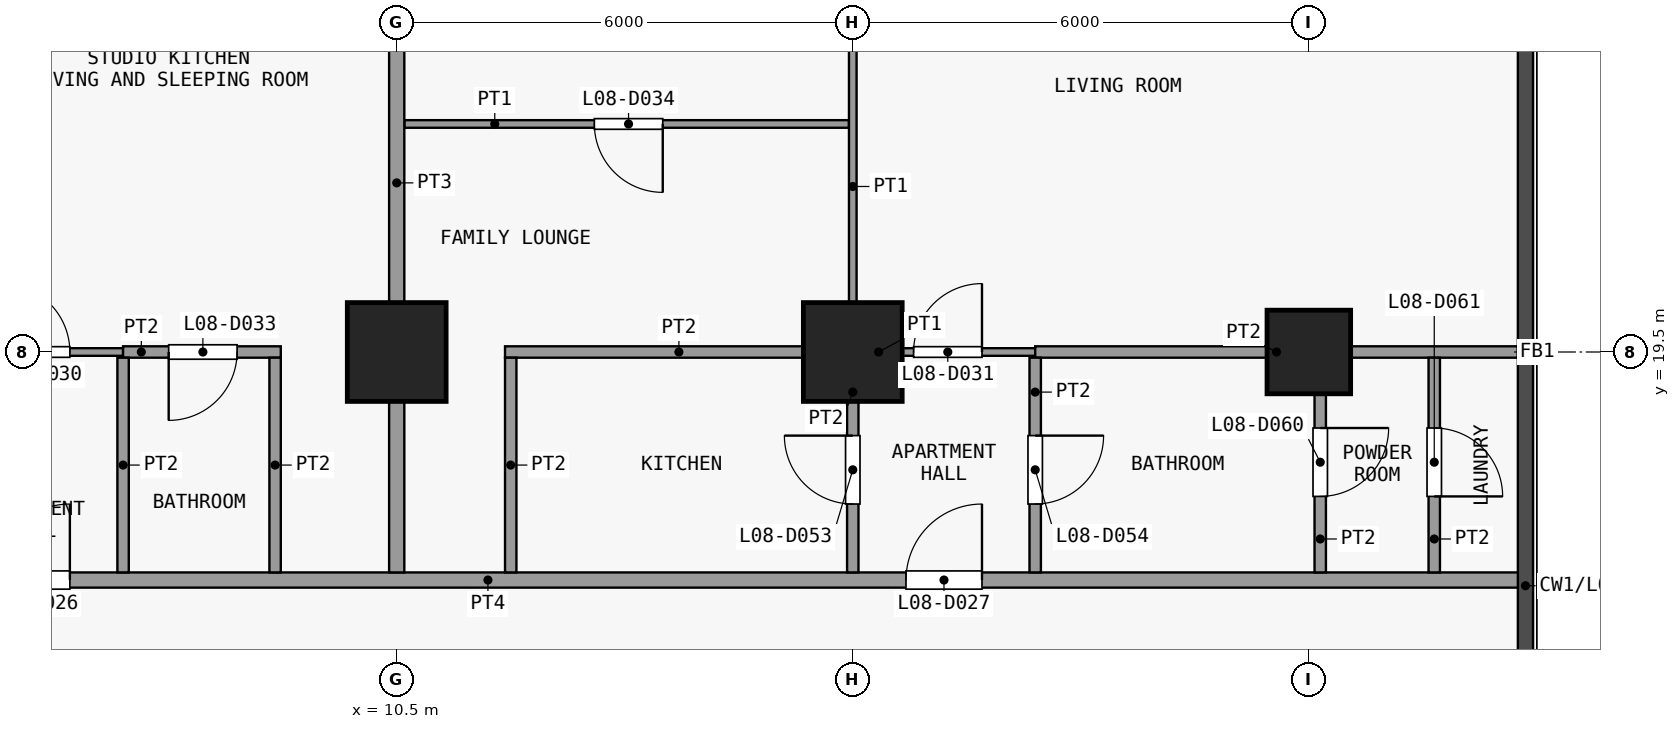
"""IFC4 building model, lengths in metres.
Left out: names, types, materials, properties, quantities, classifications, styles, units other than length and angle.
Written with IfcOpenShell. Run it as: python <this file> out.ifc"""

import sys

from ifc_helpers import new_model, si_unit, direction, frame, frame_2d, origin, origin_2d, place, context, subcontext, project, spatial, rectangle, extrude, element, fill, save


model = new_model("IFC4")
c1 = context("Model", 3, precision=1e-05, world=origin(), true_north=direction((0.0, 1.0)))
c2 = subcontext(c1, "Body", "Model", "MODEL_VIEW")
j1 = project(units=[si_unit("LENGTHUNIT", "METRE"), si_unit("PLANEANGLEUNIT", "RADIAN")], contexts=[c1])
p1 = place(None, origin())
s1 = spatial("IfcSite", under=j1, at=p1, CompositionType="ELEMENT")
p2 = place(p1, origin())
s2 = spatial("IfcBuilding", under=s1, at=p2, CompositionType="ELEMENT")
p3 = place(p2, frame((0.0, 0.0, 39.7)))
s3 = spatial("IfcBuildingStorey", under=s2, at=p3, CompositionType="ELEMENT", Elevation=39.7)
for number, where, z_axis, x_axis in (
    (1, (10.5, 19.5, 0.0), (0.0, 0.0, 1.0), (1.0, 0.0, 0.0)),
    (2, (16.5, 19.5, 0.0), (0.0, 0.0, 1.0), (1.0, 0.0, 0.0)),
):
    element("IfcColumn", number, at=place(p3, frame(where, z_axis=z_axis, x_axis=x_axis)), inside=s3, PredefinedType="COLUMN", context=c2, shape_type="SweptSolid", body=[
        extrude(rectangle(XDim=1.3, YDim=1.3, at=origin_2d()), origin(), (0.0, 0.0, 1.0), 3.6),
    ])
p4 = place(p3, frame((22.5, 19.5, 0.0), z_axis=(0.0, 0.0, 1.0), x_axis=(1.0, 0.0, 0.0)))
e3 = element("IfcColumn", 3, at=p4, inside=s3, PredefinedType="COLUMN", context=c2, shape_type="SweptSolid", body=[
    extrude(rectangle(XDim=1.1, YDim=1.1, at=origin_2d()), origin(), (0.0, 0.0, 1.0), 3.6),
])
p5 = place(p3, frame((-25.35, 16.5, 0.0), z_axis=(0.0, 0.0, 1.0), x_axis=(1.0, 0.0, 0.0)))
e4 = element("IfcWall", 4, at=p5, inside=s3, PredefinedType="PARTITIONING", context=c2, shape_type="SweptSolid", body=[
    extrude(rectangle(XDim=50.7, YDim=0.2, at=frame_2d((25.35, 0.0))), origin(), (0.0, 0.0, 1.0), 3.3),
])
p6 = place(p5, frame((4.55, 0.0, 0.0)))
e5 = element("IfcOpeningElement", 5, at=p6, cuts=e4, PredefinedType="OPENING", context=c2, shape_type="SweptSolid", body=[
    extrude(rectangle(XDim=1.0, YDim=2.1, at=frame_2d((0.5, 1.05))), frame((0.0, 0.11, 0.0), z_axis=(0.0, -1.0, 0.0), x_axis=(1.0, 0.0, 0.0)), (0.0, 0.0, 1.0), 0.22),
])
p7 = place(p5, frame((11.35, 0.0, 0.0)))
e6 = element("IfcOpeningElement", 6, at=p7, cuts=e4, PredefinedType="OPENING", context=c2, shape_type="SweptSolid", body=[
    extrude(rectangle(XDim=0.9, YDim=2.1, at=frame_2d((0.45, 1.05))), frame((0.0, 0.11, 0.0), z_axis=(0.0, -1.0, 0.0), x_axis=(1.0, 0.0, 0.0)), (0.0, 0.0, 1.0), 0.22),
])
p8 = place(p5, frame((17.35, 0.0, 0.0)))
e7 = element("IfcOpeningElement", 7, at=p8, cuts=e4, PredefinedType="OPENING", context=c2, shape_type="SweptSolid", body=[
    extrude(rectangle(XDim=0.9, YDim=2.1, at=frame_2d((0.45, 1.05))), frame((0.0, 0.11, 0.0), z_axis=(0.0, -1.0, 0.0), x_axis=(1.0, 0.0, 0.0)), (0.0, 0.0, 1.0), 0.22),
])
p9 = place(p5, frame((24.05, 0.0, 0.0)))
e8 = element("IfcOpeningElement", 8, at=p9, cuts=e4, PredefinedType="OPENING", context=c2, shape_type="SweptSolid", body=[
    extrude(rectangle(XDim=1.0, YDim=2.1, at=frame_2d((0.5, 1.05))), frame((0.0, 0.11, 0.0), z_axis=(0.0, -1.0, 0.0), x_axis=(1.0, 0.0, 0.0)), (0.0, 0.0, 1.0), 0.22),
])
p10 = place(p5, frame((30.55, 0.0, 0.0)))
e9 = element("IfcOpeningElement", 9, at=p10, cuts=e4, PredefinedType="OPENING", context=c2, shape_type="SweptSolid", body=[
    extrude(rectangle(XDim=1.0, YDim=2.1, at=frame_2d((0.5, 1.05))), frame((0.0, 0.11, 0.0), z_axis=(0.0, -1.0, 0.0), x_axis=(1.0, 0.0, 0.0)), (0.0, 0.0, 1.0), 0.22),
])
p11 = place(p5, frame((42.55, 0.0, 0.0)))
e10 = element("IfcOpeningElement", 10, at=p11, cuts=e4, PredefinedType="OPENING", context=c2, shape_type="SweptSolid", body=[
    extrude(rectangle(XDim=1.0, YDim=2.1, at=frame_2d((0.5, 1.05))), frame((0.0, 0.11, 0.0), z_axis=(0.0, -1.0, 0.0), x_axis=(1.0, 0.0, 0.0)), (0.0, 0.0, 1.0), 0.22),
])
p12 = place(p3, frame((4.5, 19.5, 0.0), z_axis=(0.0, 0.0, 1.0), x_axis=(1.0, 0.0, 0.0)))
e11 = element("IfcWall", 11, at=p12, inside=s3, PredefinedType="PARTITIONING", context=c2, shape_type="SweptSolid", body=[
    extrude(rectangle(XDim=2.4, YDim=0.1, at=frame_2d((1.2, 0.0))), origin(), (0.0, 0.0, 1.0), 3.3),
])
p13 = place(p12, frame((0.8, 0.0, 0.0)))
e12 = element("IfcOpeningElement", 12, at=p13, cuts=e11, PredefinedType="OPENING", context=c2, shape_type="SweptSolid", body=[
    extrude(rectangle(XDim=0.9, YDim=2.1, at=frame_2d((0.45, 1.05))), frame((0.0, 0.06, 0.0), z_axis=(0.0, -1.0, 0.0), x_axis=(1.0, 0.0, 0.0)), (0.0, 0.0, 1.0), 0.12),
])
p14 = place(p3, frame((16.5, 19.5, 0.0), z_axis=(0.0, 0.0, 1.0), x_axis=(1.0, 0.0, 0.0)))
e13 = element("IfcWall", 13, at=p14, inside=s3, PredefinedType="PARTITIONING", context=c2, shape_type="SweptSolid", body=[
    extrude(rectangle(XDim=2.4, YDim=0.1, at=frame_2d((1.2, 0.0))), origin(), (0.0, 0.0, 1.0), 3.3),
])
p15 = place(p14, frame((0.8, 0.0, 0.0)))
e14 = element("IfcOpeningElement", 14, at=p15, cuts=e13, PredefinedType="OPENING", context=c2, shape_type="SweptSolid", body=[
    extrude(rectangle(XDim=0.9, YDim=2.1, at=frame_2d((0.45, 1.05))), frame((0.0, 0.06, 0.0), z_axis=(0.0, -1.0, 0.0), x_axis=(1.0, 0.0, 0.0)), (0.0, 0.0, 1.0), 0.12),
])
p16 = place(p3, frame((6.9, 19.5, 0.0), z_axis=(0.0, 0.0, 1.0), x_axis=(1.0, 0.0, 0.0)))
e15 = element("IfcWall", 15, at=p16, inside=s3, PredefinedType="PARTITIONING", context=c2, shape_type="SweptSolid", body=[
    extrude(rectangle(XDim=2.075, YDim=0.15, at=frame_2d((1.038, 0.0))), origin(), (0.0, 0.0, 1.0), 3.3),
])
p17 = place(p16, frame((0.6, 0.0, 0.0)))
e16 = element("IfcOpeningElement", 16, at=p17, cuts=e15, PredefinedType="OPENING", context=c2, shape_type="SweptSolid", body=[
    extrude(rectangle(XDim=0.9, YDim=2.1, at=frame_2d((0.45, 1.05))), frame((0.0, 0.085, 0.0), z_axis=(0.0, -1.0, 0.0), x_axis=(1.0, 0.0, 0.0)), (0.0, 0.0, 1.0), 0.17),
])
p18 = place(p3, frame((11.925, 19.5, 0.0), z_axis=(0.0, 0.0, 1.0), x_axis=(1.0, 0.0, 0.0)))
e17 = element("IfcWall", 17, at=p18, inside=s3, PredefinedType="PARTITIONING", context=c2, shape_type="SweptSolid", body=[
    extrude(rectangle(XDim=4.575, YDim=0.15, at=frame_2d((2.288, 0.0))), origin(), (0.0, 0.0, 1.0), 3.3),
])
p19 = place(p3, frame((18.9, 19.5, 0.0), z_axis=(0.0, 0.0, 1.0), x_axis=(1.0, 0.0, 0.0)))
e18 = element("IfcWall", 18, at=p19, inside=s3, PredefinedType="PARTITIONING", context=c2, shape_type="SweptSolid", body=[
    extrude(rectangle(XDim=6.35, YDim=0.15, at=frame_2d((3.175, 0.0))), origin(), (0.0, 0.0, 1.0), 3.3),
])
p20 = place(p3, frame((10.6, 22.5, 0.0), z_axis=(0.0, 0.0, 1.0), x_axis=(1.0, 0.0, 0.0)))
e19 = element("IfcWall", 19, at=p20, inside=s3, PredefinedType="PARTITIONING", context=c2, shape_type="SweptSolid", body=[
    extrude(rectangle(XDim=5.85, YDim=0.1, at=frame_2d((2.925, 0.0))), origin(), (0.0, 0.0, 1.0), 3.3),
])
p21 = place(p20, frame((2.5, 0.0, 0.0)))
e20 = element("IfcOpeningElement", 20, at=p21, cuts=e19, PredefinedType="OPENING", context=c2, shape_type="SweptSolid", body=[
    extrude(rectangle(XDim=0.9, YDim=2.1, at=frame_2d((0.45, 1.05))), frame((0.0, 0.06, 0.0), z_axis=(0.0, -1.0, 0.0), x_axis=(1.0, 0.0, 0.0)), (0.0, 0.0, 1.0), 0.12),
])
for number, where, z_axis, x_axis in (
    (21, (6.9, 16.6, 0.0), (0.0, 0.0, 1.0), (0.0, 1.0, 0.0)),
    (22, (8.9, 16.6, 0.0), (0.0, 0.0, 1.0), (0.0, 1.0, 0.0)),
):
    element("IfcWall", number, at=place(p3, frame(where, z_axis=z_axis, x_axis=x_axis)), inside=s3, PredefinedType="PARTITIONING", context=c2, shape_type="SweptSolid", body=[
        extrude(rectangle(XDim=2.825, YDim=0.15, at=frame_2d((1.413, 0.0))), origin(), (0.0, 0.0, 1.0), 3.3),
    ])
p22 = place(p3, frame((10.5, 16.6, 0.0), z_axis=(0.0, 0.0, 1.0), x_axis=(0.0, 1.0, 0.0)))
e23 = element("IfcWall", 23, at=p22, inside=s3, PredefinedType="PARTITIONING", context=c2, shape_type="SweptSolid", body=[
    extrude(rectangle(XDim=10.25, YDim=0.2, at=frame_2d((5.125, 0.0))), origin(), (0.0, 0.0, 1.0), 3.3),
])
p23 = place(p3, frame((12.0, 16.6, 0.0), z_axis=(0.0, 0.0, 1.0), x_axis=(0.0, 1.0, 0.0)))
e24 = element("IfcWall", 24, at=p23, inside=s3, PredefinedType="PARTITIONING", context=c2, shape_type="SweptSolid", body=[
    extrude(rectangle(XDim=2.825, YDim=0.15, at=frame_2d((1.413, 0.0))), origin(), (0.0, 0.0, 1.0), 3.3),
])
p24 = place(p3, frame((16.5, 19.575, 0.0), z_axis=(0.0, 0.0, 1.0), x_axis=(0.0, 1.0, 0.0)))
e25 = element("IfcWall", 25, at=p24, inside=s3, PredefinedType="PARTITIONING", context=c2, shape_type="SweptSolid", body=[
    extrude(rectangle(XDim=8.675, YDim=0.1, at=frame_2d((4.337, 0.0))), origin(), (0.0, 0.0, 1.0), 3.3),
])
p25 = place(p24, frame((4.325, 0.0, 0.0)))
e26 = element("IfcOpeningElement", 26, at=p25, cuts=e25, PredefinedType="OPENING", context=c2, shape_type="SweptSolid", body=[
    extrude(rectangle(XDim=0.9, YDim=2.1, at=frame_2d((0.45, 1.05))), frame((0.0, 0.06, 0.0), z_axis=(0.0, -1.0, 0.0), x_axis=(1.0, 0.0, 0.0)), (0.0, 0.0, 1.0), 0.12),
])
p26 = place(p3, frame((16.5, 16.6, 0.0), z_axis=(0.0, 0.0, 1.0), x_axis=(0.0, 1.0, 0.0)))
e27 = element("IfcWall", 27, at=p26, inside=s3, PredefinedType="PARTITIONING", context=c2, shape_type="SweptSolid", body=[
    extrude(rectangle(XDim=2.825, YDim=0.15, at=frame_2d((1.413, 0.0))), origin(), (0.0, 0.0, 1.0), 3.3),
])
p27 = place(p26, frame((0.9, 0.0, 0.0)))
e28 = element("IfcOpeningElement", 28, at=p27, cuts=e27, PredefinedType="OPENING", context=c2, shape_type="SweptSolid", body=[
    extrude(rectangle(XDim=0.9, YDim=2.1, at=frame_2d((0.45, 1.05))), frame((0.0, 0.085, 0.0), z_axis=(0.0, -1.0, 0.0), x_axis=(1.0, 0.0, 0.0)), (0.0, 0.0, 1.0), 0.17),
])
p28 = place(p3, frame((18.9, 16.6, 0.0), z_axis=(0.0, 0.0, 1.0), x_axis=(0.0, 1.0, 0.0)))
e29 = element("IfcWall", 29, at=p28, inside=s3, PredefinedType="PARTITIONING", context=c2, shape_type="SweptSolid", body=[
    extrude(rectangle(XDim=2.825, YDim=0.15, at=frame_2d((1.413, 0.0))), origin(), (0.0, 0.0, 1.0), 3.3),
])
p29 = place(p28, frame((0.9, 0.0, 0.0)))
e30 = element("IfcOpeningElement", 30, at=p29, cuts=e29, PredefinedType="OPENING", context=c2, shape_type="SweptSolid", body=[
    extrude(rectangle(XDim=0.9, YDim=2.1, at=frame_2d((0.45, 1.05))), frame((0.0, 0.085, 0.0), z_axis=(0.0, -1.0, 0.0), x_axis=(1.0, 0.0, 0.0)), (0.0, 0.0, 1.0), 0.17),
])
p30 = place(p3, frame((22.65, 16.6, 0.0), z_axis=(0.0, 0.0, 1.0), x_axis=(0.0, 1.0, 0.0)))
e31 = element("IfcWall", 31, at=p30, inside=s3, PredefinedType="PARTITIONING", context=c2, shape_type="SweptSolid", body=[
    extrude(rectangle(XDim=2.825, YDim=0.15, at=frame_2d((1.413, 0.0))), origin(), (0.0, 0.0, 1.0), 3.3),
])
p31 = place(p30, frame((1.0, 0.0, 0.0)))
e32 = element("IfcOpeningElement", 32, at=p31, cuts=e31, PredefinedType="OPENING", context=c2, shape_type="SweptSolid", body=[
    extrude(rectangle(XDim=0.9, YDim=2.1, at=frame_2d((0.45, 1.05))), frame((0.0, 0.085, 0.0), z_axis=(0.0, -1.0, 0.0), x_axis=(1.0, 0.0, 0.0)), (0.0, 0.0, 1.0), 0.17),
])
p32 = place(p3, frame((24.15, 16.6, 0.0), z_axis=(0.0, 0.0, 1.0), x_axis=(0.0, 1.0, 0.0)))
e33 = element("IfcWall", 33, at=p32, inside=s3, PredefinedType="PARTITIONING", context=c2, shape_type="SweptSolid", body=[
    extrude(rectangle(XDim=2.825, YDim=0.15, at=frame_2d((1.413, 0.0))), origin(), (0.0, 0.0, 1.0), 3.3),
])
p33 = place(p32, frame((1.0, 0.0, 0.0)))
e34 = element("IfcOpeningElement", 34, at=p33, cuts=e33, PredefinedType="OPENING", context=c2, shape_type="SweptSolid", body=[
    extrude(rectangle(XDim=0.9, YDim=2.1, at=frame_2d((0.45, 1.05))), frame((0.0, 0.085, 0.0), z_axis=(0.0, -1.0, 0.0), x_axis=(1.0, 0.0, 0.0)), (0.0, 0.0, 1.0), 0.17),
])
p34 = place(p10, origin())
e35 = element("IfcDoor", 35, at=p34, inside=s3, OperationType="SINGLE_SWING_LEFT", PredefinedType="DOOR", context=c2, shape_type="SweptSolid", body=[
    extrude(rectangle(XDim=1.0, YDim=2.1, at=frame_2d((0.5, 1.05))), frame((0.0, 0.025, 0.0), z_axis=(0.0, -1.0, 0.0), x_axis=(1.0, 0.0, 0.0)), (0.0, 0.0, 1.0), 0.05),
])
fill(e9, e35)
p35 = place(p11, origin())
e36 = element("IfcDoor", 36, at=p35, inside=s3, OperationType="SINGLE_SWING_LEFT", PredefinedType="DOOR", context=c2, shape_type="SweptSolid", body=[
    extrude(rectangle(XDim=1.0, YDim=2.1, at=frame_2d((0.5, 1.05))), frame((0.0, 0.025, 0.0), z_axis=(0.0, -1.0, 0.0), x_axis=(1.0, 0.0, 0.0)), (0.0, 0.0, 1.0), 0.05),
])
fill(e10, e36)
p36 = place(p13, origin())
e37 = element("IfcDoor", 37, at=p36, inside=s3, OperationType="SINGLE_SWING_RIGHT", PredefinedType="DOOR", context=c2, shape_type="SweptSolid", body=[
    extrude(rectangle(XDim=0.9, YDim=2.1, at=frame_2d((0.45, 1.05))), frame((0.0, 0.025, 0.0), z_axis=(0.0, -1.0, 0.0), x_axis=(1.0, 0.0, 0.0)), (0.0, 0.0, 1.0), 0.05),
])
fill(e12, e37)
p37 = place(p15, origin())
e38 = element("IfcDoor", 38, at=p37, inside=s3, OperationType="SINGLE_SWING_LEFT", PredefinedType="DOOR", context=c2, shape_type="SweptSolid", body=[
    extrude(rectangle(XDim=0.9, YDim=2.1, at=frame_2d((0.45, 1.05))), frame((0.0, 0.025, 0.0), z_axis=(0.0, -1.0, 0.0), x_axis=(1.0, 0.0, 0.0)), (0.0, 0.0, 1.0), 0.05),
])
fill(e14, e38)
p38 = place(p17, origin())
e39 = element("IfcDoor", 39, at=p38, inside=s3, OperationType="SINGLE_SWING_LEFT", PredefinedType="DOOR", context=c2, shape_type="SweptSolid", body=[
    extrude(rectangle(XDim=0.9, YDim=2.1, at=frame_2d((0.45, 1.05))), frame((0.0, 0.025, 0.0), z_axis=(0.0, -1.0, 0.0), x_axis=(1.0, 0.0, 0.0)), (0.0, 0.0, 1.0), 0.05),
])
fill(e16, e39)
p39 = place(p21, origin())
e40 = element("IfcDoor", 40, at=p39, inside=s3, OperationType="SINGLE_SWING_RIGHT", PredefinedType="DOOR", context=c2, shape_type="SweptSolid", body=[
    extrude(rectangle(XDim=0.9, YDim=2.1, at=frame_2d((0.45, 1.05))), frame((0.0, 0.025, 0.0), z_axis=(0.0, -1.0, 0.0), x_axis=(1.0, 0.0, 0.0)), (0.0, 0.0, 1.0), 0.05),
])
fill(e20, e40)
p40 = place(p27, origin())
e41 = element("IfcDoor", 41, at=p40, inside=s3, OperationType="SINGLE_SWING_LEFT", PredefinedType="DOOR", context=c2, shape_type="SweptSolid", body=[
    extrude(rectangle(XDim=0.9, YDim=2.1, at=frame_2d((0.45, 1.05))), frame((0.0, 0.025, 0.0), z_axis=(0.0, -1.0, 0.0), x_axis=(1.0, 0.0, 0.0)), (0.0, 0.0, 1.0), 0.05),
])
fill(e28, e41)
p41 = place(p29, origin())
e42 = element("IfcDoor", 42, at=p41, inside=s3, OperationType="SINGLE_SWING_RIGHT", PredefinedType="DOOR", context=c2, shape_type="SweptSolid", body=[
    extrude(rectangle(XDim=0.9, YDim=2.1, at=frame_2d((0.45, 1.05))), frame((0.0, 0.025, 0.0), z_axis=(0.0, -1.0, 0.0), x_axis=(1.0, 0.0, 0.0)), (0.0, 0.0, 1.0), 0.05),
])
fill(e30, e42)
p42 = place(p31, origin())
e43 = element("IfcDoor", 43, at=p42, inside=s3, OperationType="SINGLE_SWING_RIGHT", PredefinedType="DOOR", context=c2, shape_type="SweptSolid", body=[
    extrude(rectangle(XDim=0.9, YDim=2.1, at=frame_2d((0.45, 1.05))), frame((0.0, 0.025, 0.0), z_axis=(0.0, -1.0, 0.0), x_axis=(1.0, 0.0, 0.0)), (0.0, 0.0, 1.0), 0.05),
])
fill(e32, e43)
p43 = place(p33, origin())
e44 = element("IfcDoor", 44, at=p43, inside=s3, OperationType="SINGLE_SWING_LEFT", PredefinedType="DOOR", context=c2, shape_type="SweptSolid", body=[
    extrude(rectangle(XDim=0.9, YDim=2.1, at=frame_2d((0.45, 1.05))), frame((0.0, 0.025, 0.0), z_axis=(0.0, -1.0, 0.0), x_axis=(1.0, 0.0, 0.0)), (0.0, 0.0, 1.0), 0.05),
])
fill(e34, e44)
save(model, sys.argv[1])
